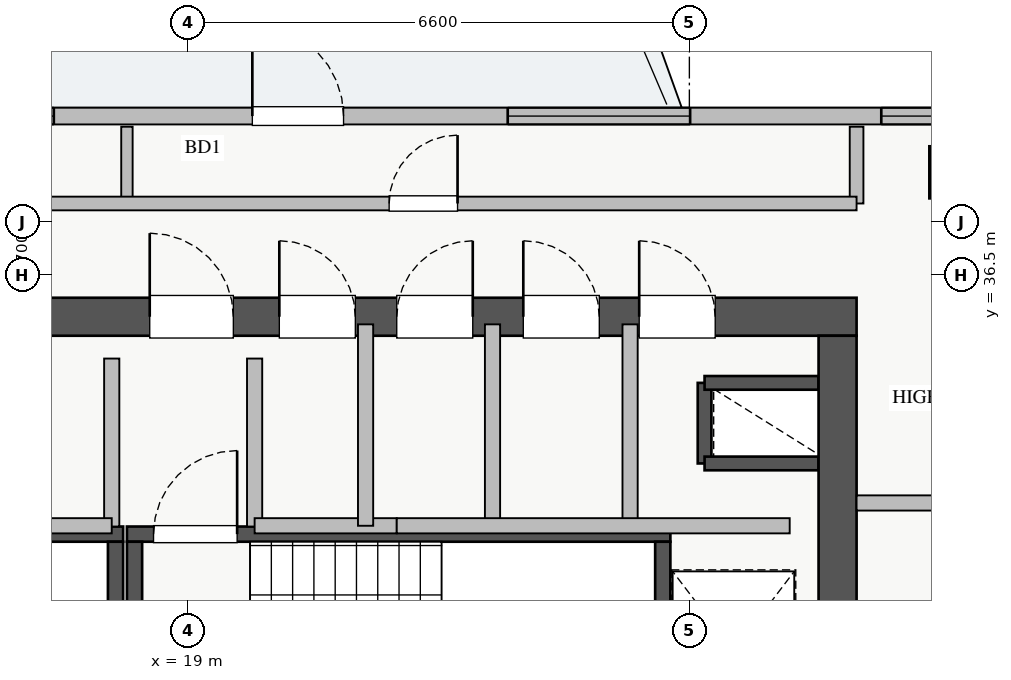
"""IFC4 building model, lengths in metres.
Left out: names, types, materials, properties, quantities, classifications, styles, units other than length and angle.
Written with IfcOpenShell. Run it as: python <this file> out.ifc"""

import sys

from ifc_helpers import new_model, si_unit, direction, frame, frame_2d, origin, origin_2d, place, context, subcontext, project, spatial, rectangle, extrude, source, transform, mapped, element, fill, save


model = new_model("IFC4")
c1 = context("Model", 3, precision=1e-05, world=origin(), true_north=direction((0.0, 1.0)))
c2 = subcontext(c1, "Body", "Model", "MODEL_VIEW")
j1 = project(units=[si_unit("LENGTHUNIT", "METRE"), si_unit("PLANEANGLEUNIT", "RADIAN")], contexts=[c1])
p1 = place(None, origin())
s1 = spatial("IfcSite", under=j1, at=p1, CompositionType="ELEMENT")
p2 = place(p1, origin())
s2 = spatial("IfcBuilding", under=s1, at=p2, CompositionType="ELEMENT")
p3 = place(p2, frame((0.0, 0.0, 253.5)))
s3 = spatial("IfcBuildingStorey", under=s2, at=p3, CompositionType="ELEMENT", Elevation=253.5)
p4 = place(p3, frame((25.8, 34.02, 0.0), z_axis=(0.0, 0.0, 1.0), x_axis=(0.0, 1.0, 0.0)))
e1 = element("IfcWall", 1, at=p4, inside=s3, PredefinedType="SHEAR", context=c2, shape_type="SweptSolid", body=[
    extrude(rectangle(XDim=1.06, YDim=0.18, at=frame_2d((0.53, 0.0))), origin(), (0.0, 0.0, 1.0), 3.07),
])
for number, where, z_axis, x_axis in (
    (2, (25.8, 35.08, 0.0), (0.0, 0.0, 1.0), (1.0, 0.0, 0.0)),
    (3, (25.8, 34.02, 0.0), (0.0, 0.0, 1.0), (1.0, 0.0, 0.0)),
):
    element("IfcWall", number, at=place(p3, frame(where, z_axis=z_axis, x_axis=x_axis)), inside=s3, PredefinedType="SHEAR", context=c2, shape_type="SweptSolid", body=[
        extrude(rectangle(XDim=1.5, YDim=0.18, at=frame_2d((0.75, 0.0))), origin(), (0.0, 0.0, 1.0), 3.07),
    ])
p5 = place(p3, frame((10.7, 33.09, 0.0), z_axis=(0.0, 0.0, 1.0), x_axis=(1.0, 0.0, 0.0)))
e4 = element("IfcWall", 4, at=p5, inside=s3, PredefinedType="SHEAR", context=c2, shape_type="SweptSolid", body=[
    extrude(rectangle(XDim=7.45, YDim=0.2, at=frame_2d((3.725, 0.0))), origin(), (0.0, 0.0, 1.0), 3.25),
])
p6 = place(p5, frame((0.35, 0.0, 0.0)))
e5 = element("IfcOpeningElement", 5, at=p6, cuts=e4, PredefinedType="OPENING", context=c2, shape_type="SweptSolid", body=[
    extrude(rectangle(XDim=1.1, YDim=2.05, at=frame_2d((0.55, 1.025))), frame((0.0, 0.11, 0.0), z_axis=(0.0, -1.0, 0.0), x_axis=(1.0, 0.0, 0.0)), (0.0, 0.0, 1.0), 0.22),
])
p7 = place(p3, frame((18.05, 30.05, 0.0), z_axis=(0.0, 0.0, 1.0), x_axis=(0.0, 1.0, 0.0)))
e6 = element("IfcWall", 6, at=p7, inside=s3, PredefinedType="SHEAR", context=c2, shape_type="SweptSolid", body=[
    extrude(rectangle(XDim=2.94, YDim=0.2, at=frame_2d((1.47, 0.0))), origin(), (0.0, 0.0, 1.0), 3.25),
])
p8 = place(p3, frame((18.2, 33.09, 0.0), z_axis=(0.0, 0.0, 1.0), x_axis=(1.0, 0.0, 0.0)))
e7 = element("IfcWall", 7, at=p8, inside=s3, PredefinedType="SHEAR", context=c2, shape_type="SweptSolid", body=[
    extrude(rectangle(XDim=7.15, YDim=0.2, at=frame_2d((3.575, 0.0))), origin(), (0.0, 0.0, 1.0), 3.25),
])
p9 = place(p8, frame((0.35, 0.0, 0.0)))
e8 = element("IfcOpeningElement", 8, at=p9, cuts=e7, PredefinedType="OPENING", context=c2, shape_type="SweptSolid", body=[
    extrude(rectangle(XDim=1.1, YDim=2.05, at=frame_2d((0.55, 1.025))), frame((0.0, 0.11, 0.0), z_axis=(0.0, -1.0, 0.0), x_axis=(1.0, 0.0, 0.0)), (0.0, 0.0, 1.0), 0.22),
])
for number, where, z_axis, x_axis in (
    (9, (18.3, 30.05, 0.0), (0.0, 0.0, 1.0), (0.0, 1.0, 0.0)),
    (10, (25.25, 30.05, 0.0), (0.0, 0.0, 1.0), (0.0, 1.0, 0.0)),
):
    element("IfcWall", number, at=place(p3, frame(where, z_axis=z_axis, x_axis=x_axis)), inside=s3, PredefinedType="SHEAR", context=c2, shape_type="SweptSolid", body=[
        extrude(rectangle(XDim=2.94, YDim=0.2, at=frame_2d((1.47, 0.0))), origin(), (0.0, 0.0, 1.0), 3.25),
    ])
p10 = place(p3, frame((10.2, 35.95, 0.0), z_axis=(0.0, 0.0, 1.0), x_axis=(1.0, 0.0, 0.0)))
e11 = element("IfcWall", 11, at=p10, inside=s3, PredefinedType="SHEAR", context=c2, shape_type="SweptSolid", body=[
    extrude(rectangle(XDim=17.6, YDim=0.5, at=frame_2d((8.8, 0.0))), origin(), (0.0, 0.0, 1.0), 3.25),
])
p11 = place(p10, frame((1.15, 0.0, 0.0)))
e12 = element("IfcOpeningElement", 12, at=p11, cuts=e11, PredefinedType="OPENING", context=c2, shape_type="SweptSolid", body=[
    extrude(rectangle(XDim=1.1, YDim=2.05, at=frame_2d((0.55, 1.025))), frame((0.0, 0.26, 0.0), z_axis=(0.0, -1.0, 0.0), x_axis=(1.0, 0.0, 0.0)), (0.0, 0.0, 1.0), 0.52),
])
p12 = place(p10, frame((8.3, 0.0, 0.0)))
e13 = element("IfcOpeningElement", 13, at=p12, cuts=e11, PredefinedType="OPENING", context=c2, shape_type="SweptSolid", body=[
    extrude(rectangle(XDim=1.1, YDim=2.05, at=frame_2d((0.55, 1.025))), frame((0.0, 0.26, 0.0), z_axis=(0.0, -1.0, 0.0), x_axis=(1.0, 0.0, 0.0)), (0.0, 0.0, 1.0), 0.52),
])
p13 = place(p10, frame((2.85, 0.0, 0.0)))
e14 = element("IfcOpeningElement", 14, at=p13, cuts=e11, PredefinedType="OPENING", context=c2, shape_type="SweptSolid", body=[
    extrude(rectangle(XDim=1.1, YDim=2.05, at=frame_2d((0.55, 1.025))), frame((0.0, 0.26, 0.0), z_axis=(0.0, -1.0, 0.0), x_axis=(1.0, 0.0, 0.0)), (0.0, 0.0, 1.0), 0.52),
])
p14 = place(p10, frame((5.8, 0.0, 0.0)))
e15 = element("IfcOpeningElement", 15, at=p14, cuts=e11, PredefinedType="OPENING", context=c2, shape_type="SweptSolid", body=[
    extrude(rectangle(XDim=1.0, YDim=2.05, at=frame_2d((0.5, 1.025))), frame((0.0, 0.26, 0.0), z_axis=(0.0, -1.0, 0.0), x_axis=(1.0, 0.0, 0.0)), (0.0, 0.0, 1.0), 0.52),
])
p15 = place(p10, frame((14.74, 0.0, 0.0)))
e16 = element("IfcOpeningElement", 16, at=p15, cuts=e11, PredefinedType="OPENING", context=c2, shape_type="SweptSolid", body=[
    extrude(rectangle(XDim=1.0, YDim=2.05, at=frame_2d((0.5, 1.025))), frame((0.0, 0.26, 0.0), z_axis=(0.0, -1.0, 0.0), x_axis=(1.0, 0.0, 0.0)), (0.0, 0.0, 1.0), 0.52),
])
p16 = place(p10, frame((10.005, 0.0, 0.0)))
e17 = element("IfcOpeningElement", 17, at=p16, cuts=e11, PredefinedType="OPENING", context=c2, shape_type="SweptSolid", body=[
    extrude(rectangle(XDim=1.0, YDim=2.05, at=frame_2d((0.5, 1.025))), frame((0.0, 0.26, 0.0), z_axis=(0.0, -1.0, 0.0), x_axis=(1.0, 0.0, 0.0)), (0.0, 0.0, 1.0), 0.52),
])
p17 = place(p10, frame((11.55, 0.0, 0.0)))
e18 = element("IfcOpeningElement", 18, at=p17, cuts=e11, PredefinedType="OPENING", context=c2, shape_type="SweptSolid", body=[
    extrude(rectangle(XDim=1.0, YDim=2.05, at=frame_2d((0.5, 1.025))), frame((0.0, 0.26, 0.0), z_axis=(0.0, -1.0, 0.0), x_axis=(1.0, 0.0, 0.0)), (0.0, 0.0, 1.0), 0.52),
])
p18 = place(p10, frame((13.215, 0.0, 0.0)))
e19 = element("IfcOpeningElement", 19, at=p18, cuts=e11, PredefinedType="OPENING", context=c2, shape_type="SweptSolid", body=[
    extrude(rectangle(XDim=1.0, YDim=2.05, at=frame_2d((0.5, 1.025))), frame((0.0, 0.26, 0.0), z_axis=(0.0, -1.0, 0.0), x_axis=(1.0, 0.0, 0.0)), (0.0, 0.0, 1.0), 0.52),
])
p19 = place(p3, frame((27.55, 29.5, 0.0), z_axis=(0.0, 0.0, 1.0), x_axis=(0.0, 1.0, 0.0)))
e20 = element("IfcWall", 20, at=p19, inside=s3, PredefinedType="SHEAR", context=c2, shape_type="SweptSolid", body=[
    extrude(rectangle(XDim=6.2, YDim=0.5, at=frame_2d((3.1, 0.0))), origin(), (0.0, 0.0, 1.0), 3.25),
])
p20 = place(p19, frame((1.1, 0.0, 0.0)))
e21 = element("IfcOpeningElement", 21, at=p20, cuts=e20, PredefinedType="OPENING", context=c2, shape_type="SweptSolid", body=[
    extrude(rectangle(XDim=1.3, YDim=2.05, at=frame_2d((0.65, 1.025))), frame((0.0, 0.26, 0.0), z_axis=(0.0, -1.0, 0.0), x_axis=(1.0, 0.0, 0.0)), (0.0, 0.0, 1.0), 0.52),
])
m1 = source(origin(), c2, "Body", "SweptSolid", [
    extrude(rectangle(XDim=0.65, YDim=0.65, at=origin_2d()), origin(), (0.0, 0.0, 1.0), 3.25),
])
p21 = place(p3, frame((29.1, 37.85, 0.0), z_axis=(0.0, 0.0, 1.0), x_axis=(1.0, 0.0, 0.0)))
e22 = element("IfcColumn", 22, at=p21, inside=s3, PredefinedType="COLUMN", context=c2, shape_type="MappedRepresentation", body=[
    mapped(m1, transform((0.0, 0.0, 0.0), x_axis=(1.0, 0.0, 0.0), y_axis=(0.0, 1.0, 0.0), z_axis=(0.0, 0.0, 1.0), scale=1.0)),
])
p22 = place(p3, frame((8.35, 38.59, 0.0), z_axis=(0.0, 0.0, 1.0), x_axis=(1.0, 0.0, 0.0)))
e23 = element("IfcWall", 23, at=p22, inside=s3, PredefinedType="STANDARD", context=c2, shape_type="SweptSolid", body=[
    extrude(rectangle(XDim=21.3, YDim=0.22, at=frame_2d((10.65, 0.0))), origin(), (0.0, 0.0, 1.0), 2.61),
])
p23 = place(p22, frame((11.5, 0.0, 0.0)))
e24 = element("IfcOpeningElement", 24, at=p23, cuts=e23, PredefinedType="OPENING", context=c2, shape_type="SweptSolid", body=[
    extrude(rectangle(XDim=1.2, YDim=2.1, at=frame_2d((0.6, 1.05))), frame((0.0, 0.12, 0.0), z_axis=(0.0, -1.0, 0.0), x_axis=(1.0, 0.0, 0.0)), (0.0, 0.0, 1.0), 0.24),
])
p24 = place(p22, frame((1.463, 0.0, 0.9)))
e25 = element("IfcOpeningElement", 25, at=p24, cuts=e23, PredefinedType="OPENING", context=c2, shape_type="SweptSolid", body=[
    extrude(rectangle(XDim=2.4, YDim=1.48, at=frame_2d((1.2, 0.74))), frame((0.0, 0.12, 0.0), z_axis=(0.0, -1.0, 0.0), x_axis=(1.0, 0.0, 0.0)), (0.0, 0.0, 1.0), 0.24),
])
p25 = place(p22, frame((7.088, 0.0, 0.9)))
e26 = element("IfcOpeningElement", 26, at=p25, cuts=e23, PredefinedType="OPENING", context=c2, shape_type="SweptSolid", body=[
    extrude(rectangle(XDim=1.8, YDim=1.45, at=frame_2d((0.9, 0.725))), frame((0.0, 0.12, 0.0), z_axis=(0.0, -1.0, 0.0), x_axis=(1.0, 0.0, 0.0)), (0.0, 0.0, 1.0), 0.24),
])
p26 = place(p22, frame((19.775, 0.0, 0.9)))
e27 = element("IfcOpeningElement", 27, at=p26, cuts=e23, PredefinedType="OPENING", context=c2, shape_type="SweptSolid", body=[
    extrude(rectangle(XDim=1.2, YDim=1.4, at=frame_2d((0.6, 0.7))), frame((0.0, 0.12, 0.0), z_axis=(0.0, -1.0, 0.0), x_axis=(1.0, 0.0, 0.0)), (0.0, 0.0, 1.0), 0.24),
])
p27 = place(p22, frame((14.86, 0.0, 0.9)))
e28 = element("IfcOpeningElement", 28, at=p27, cuts=e23, PredefinedType="OPENING", context=c2, shape_type="SweptSolid", body=[
    extrude(rectangle(XDim=2.4, YDim=1.5, at=frame_2d((1.2, 0.75))), frame((0.0, 0.12, 0.0), z_axis=(0.0, -1.0, 0.0), x_axis=(1.0, 0.0, 0.0)), (0.0, 0.0, 1.0), 0.24),
])
p28 = place(p3, frame((27.8, 33.5, 0.0), z_axis=(0.0, 0.0, 1.0), x_axis=(1.0, 0.0, 0.0)))
e29 = element("IfcWall", 29, at=p28, inside=s3, PredefinedType="PARTITIONING", context=c2, shape_type="SweptSolid", body=[
    extrude(rectangle(XDim=3.1, YDim=0.2, at=frame_2d((1.55, 0.0))), origin(), (0.0, 0.0, 1.0), 3.07),
])
for number, where, z_axis, x_axis in (
    (30, (18.0, 33.19, 0.0), (0.0, 0.0, 1.0), (0.0, 1.0, 0.0)),
    (31, (19.88, 33.19, 0.0), (0.0, 0.0, 1.0), (0.0, 1.0, 0.0)),
):
    element("IfcWall", number, at=place(p3, frame(where, z_axis=z_axis, x_axis=x_axis)), inside=s3, PredefinedType="PARTITIONING", context=c2, shape_type="SweptSolid", body=[
        extrude(rectangle(XDim=2.21, YDim=0.2, at=frame_2d((1.105, 0.0))), origin(), (0.0, 0.0, 1.0), 3.07),
    ])
p29 = place(p3, frame((14.72, 33.2, 0.0), z_axis=(0.0, 0.0, 1.0), x_axis=(1.0, 0.0, 0.0)))
e32 = element("IfcWall", 32, at=p29, inside=s3, PredefinedType="PARTITIONING", context=c2, shape_type="SweptSolid", body=[
    extrude(rectangle(XDim=3.28, YDim=0.2, at=frame_2d((1.64, 0.0))), origin(), (0.0, 0.0, 1.0), 3.07),
])
p30 = place(p3, frame((24.82, 33.2, 0.0), z_axis=(0.0, 0.0, 1.0), x_axis=(0.0, 1.0, 0.0)))
e33 = element("IfcWall", 33, at=p30, inside=s3, PredefinedType="PARTITIONING", context=c2, shape_type="SweptSolid", body=[
    extrude(rectangle(XDim=2.65, YDim=0.2, at=frame_2d((1.325, 0.0))), origin(), (0.0, 0.0, 1.0), 3.07),
])
p31 = place(p3, frame((19.88, 33.2, 0.0), z_axis=(0.0, 0.0, 1.0), x_axis=(1.0, 0.0, 0.0)))
e34 = element("IfcWall", 34, at=p31, inside=s3, PredefinedType="PARTITIONING", context=c2, shape_type="SweptSolid", body=[
    extrude(rectangle(XDim=1.87, YDim=0.2, at=frame_2d((0.935, 0.0))), origin(), (0.0, 0.0, 1.0), 3.07),
])
for number, where, z_axis, x_axis in (
    (35, (21.34, 33.2, 0.0), (0.0, 0.0, 1.0), (0.0, 1.0, 0.0)),
    (36, (23.01, 33.2, 0.0), (0.0, 0.0, 1.0), (0.0, 1.0, 0.0)),
):
    element("IfcWall", number, at=place(p3, frame(where, z_axis=z_axis, x_axis=x_axis)), inside=s3, PredefinedType="PARTITIONING", context=c2, shape_type="SweptSolid", body=[
        extrude(rectangle(XDim=2.65, YDim=0.2, at=frame_2d((1.325, 0.0))), origin(), (0.0, 0.0, 1.0), 3.07),
    ])
p32 = place(p3, frame((21.75, 33.2, 0.0), z_axis=(0.0, 0.0, 1.0), x_axis=(1.0, 0.0, 0.0)))
e37 = element("IfcWall", 37, at=p32, inside=s3, PredefinedType="PARTITIONING", context=c2, shape_type="SweptSolid", body=[
    extrude(rectangle(XDim=5.17, YDim=0.2, at=frame_2d((2.585, 0.0))), origin(), (0.0, 0.0, 1.0), 3.07),
])
p33 = place(p3, frame((27.8, 37.44, 0.0), z_axis=(0.0, 0.0, 1.0), x_axis=(0.0, 1.0, 0.0)))
e38 = element("IfcWall", 38, at=p33, inside=s3, PredefinedType="PARTITIONING", context=c2, shape_type="SweptSolid", body=[
    extrude(rectangle(XDim=1.01, YDim=0.18, at=frame_2d((0.505, 0.0))), origin(), (0.0, 0.0, 1.0), 3.07),
])
p34 = place(p3, frame((18.2, 37.44, 0.0), z_axis=(0.0, 0.0, 1.0), x_axis=(0.0, 1.0, 0.0)))
e39 = element("IfcWall", 39, at=p34, inside=s3, PredefinedType="PARTITIONING", context=c2, shape_type="SweptSolid", body=[
    extrude(rectangle(XDim=1.01, YDim=0.15, at=frame_2d((0.505, 0.0))), origin(), (0.0, 0.0, 1.0), 3.07),
])
p35 = place(p3, frame((8.85, 37.44, 0.0), z_axis=(0.0, 0.0, 1.0), x_axis=(1.0, 0.0, 0.0)))
e40 = element("IfcWall", 40, at=p35, inside=s3, PredefinedType="PARTITIONING", context=c2, shape_type="SweptSolid", body=[
    extrude(rectangle(XDim=18.95, YDim=0.18, at=frame_2d((9.475, 0.0))), origin(), (0.0, 0.0, 1.0), 3.07),
])
p36 = place(p35, frame((4.2, 0.0, 0.0)))
e41 = element("IfcOpeningElement", 41, at=p36, cuts=e40, PredefinedType="OPENING", context=c2, shape_type="SweptSolid", body=[
    extrude(rectangle(XDim=0.9, YDim=2.05, at=frame_2d((0.45, 1.025))), frame((0.0, 0.1, 0.0), z_axis=(0.0, -1.0, 0.0), x_axis=(1.0, 0.0, 0.0)), (0.0, 0.0, 1.0), 0.2),
])
p37 = place(p35, frame((12.8, 0.0, 0.0)))
e42 = element("IfcOpeningElement", 42, at=p37, cuts=e40, PredefinedType="OPENING", context=c2, shape_type="SweptSolid", body=[
    extrude(rectangle(XDim=0.9, YDim=2.05, at=frame_2d((0.45, 1.025))), frame((0.0, 0.1, 0.0), z_axis=(0.0, -1.0, 0.0), x_axis=(1.0, 0.0, 0.0)), (0.0, 0.0, 1.0), 0.2),
])
m2 = source(origin(), c2, "Body", "SweptSolid", [
    extrude(rectangle(XDim=1.2, YDim=2.1, at=frame_2d((0.6, 1.05))), frame((0.0, 0.025, 0.0), z_axis=(0.0, -1.0, 0.0), x_axis=(1.0, 0.0, 0.0)), (0.0, 0.0, 1.0), 0.05),
])
p38 = place(p23, origin())
e43 = element("IfcDoor", 43, at=p38, inside=s3, OperationType="SINGLE_SWING_LEFT", PredefinedType="DOOR", context=c2, shape_type="MappedRepresentation", body=[
    mapped(m2, transform((0.0, 0.0, 0.0), x_axis=(1.0, 0.0, 0.0), y_axis=(0.0, 1.0, 0.0), z_axis=(0.0, 0.0, 1.0), scale=1.0)),
])
fill(e24, e43)
m3 = source(origin(), c2, "Body", "SweptSolid", [
    extrude(rectangle(XDim=1.8, YDim=1.45, at=frame_2d((0.9, 0.725))), frame((0.0, 0.03, 0.0), z_axis=(0.0, -1.0, 0.0), x_axis=(1.0, 0.0, 0.0)), (0.0, 0.0, 1.0), 0.06),
])
p39 = place(p25, origin())
e44 = element("IfcWindow", 44, at=p39, inside=s3, PartitioningType="DOUBLE_PANEL_VERTICAL", PredefinedType="WINDOW", context=c2, shape_type="MappedRepresentation", body=[
    mapped(m3, transform((0.0, 0.0, 0.0), x_axis=(1.0, 0.0, 0.0), y_axis=(0.0, 1.0, 0.0), z_axis=(0.0, 0.0, 1.0), scale=1.0)),
])
fill(e26, e44)
m4 = source(origin(), c2, "Body", "SweptSolid", [
    extrude(rectangle(XDim=1.2, YDim=1.4, at=frame_2d((0.6, 0.7))), frame((0.0, 0.03, 0.0), z_axis=(0.0, -1.0, 0.0), x_axis=(1.0, 0.0, 0.0)), (0.0, 0.0, 1.0), 0.06),
])
p40 = place(p26, origin())
e45 = element("IfcWindow", 45, at=p40, inside=s3, PartitioningType="TRIPLE_PANEL_VERTICAL", PredefinedType="WINDOW", context=c2, shape_type="MappedRepresentation", body=[
    mapped(m4, transform((0.0, 0.0, 0.0), x_axis=(1.0, 0.0, 0.0), y_axis=(0.0, 1.0, 0.0), z_axis=(0.0, 0.0, 1.0), scale=1.0)),
])
fill(e27, e45)
m5 = source(origin(), c2, "Body", "SweptSolid", [
    extrude(rectangle(XDim=1.1, YDim=2.05, at=frame_2d((0.55, 1.025))), frame((0.0, 0.025, 0.0), z_axis=(0.0, -1.0, 0.0), x_axis=(1.0, 0.0, 0.0)), (0.0, 0.0, 1.0), 0.05),
])
p41 = place(p12, origin())
e46 = element("IfcDoor", 46, at=p41, inside=s3, OperationType="SINGLE_SWING_LEFT", PredefinedType="DOOR", context=c2, shape_type="MappedRepresentation", body=[
    mapped(m5, transform((0.0, 0.0, 0.0), x_axis=(1.0, 0.0, 0.0), y_axis=(0.0, 1.0, 0.0), z_axis=(0.0, 0.0, 1.0), scale=1.0)),
])
fill(e13, e46)
p42 = place(p9, origin())
e47 = element("IfcDoor", 47, at=p42, inside=s3, OperationType="SINGLE_SWING_RIGHT", PredefinedType="DOOR", context=c2, shape_type="MappedRepresentation", body=[
    mapped(m5, transform((0.0, 0.0, 0.0), x_axis=(1.0, 0.0, 0.0), y_axis=(0.0, 1.0, 0.0), z_axis=(0.0, 0.0, 1.0), scale=1.0)),
])
fill(e8, e47)
m6 = source(origin(), c2, "Body", "SweptSolid", [
    extrude(rectangle(XDim=1.0, YDim=2.05, at=frame_2d((0.5, 1.025))), frame((0.0, 0.025, 0.0), z_axis=(0.0, -1.0, 0.0), x_axis=(1.0, 0.0, 0.0)), (0.0, 0.0, 1.0), 0.05),
])
p43 = place(p15, origin())
e48 = element("IfcDoor", 48, at=p43, inside=s3, OperationType="SINGLE_SWING_LEFT", PredefinedType="DOOR", context=c2, shape_type="MappedRepresentation", body=[
    mapped(m6, transform((0.0, 0.0, 0.0), x_axis=(1.0, 0.0, 0.0), y_axis=(0.0, 1.0, 0.0), z_axis=(0.0, 0.0, 1.0), scale=1.0)),
])
fill(e16, e48)
p44 = place(p16, origin())
e49 = element("IfcDoor", 49, at=p44, inside=s3, OperationType="SINGLE_SWING_LEFT", PredefinedType="DOOR", context=c2, shape_type="MappedRepresentation", body=[
    mapped(m6, transform((0.0, 0.0, 0.0), x_axis=(1.0, 0.0, 0.0), y_axis=(0.0, 1.0, 0.0), z_axis=(0.0, 0.0, 1.0), scale=1.0)),
])
fill(e17, e49)
p45 = place(p17, origin())
e50 = element("IfcDoor", 50, at=p45, inside=s3, OperationType="SINGLE_SWING_RIGHT", PredefinedType="DOOR", context=c2, shape_type="MappedRepresentation", body=[
    mapped(m6, transform((0.0, 0.0, 0.0), x_axis=(1.0, 0.0, 0.0), y_axis=(0.0, 1.0, 0.0), z_axis=(0.0, 0.0, 1.0), scale=1.0)),
])
fill(e18, e50)
p46 = place(p18, origin())
e51 = element("IfcDoor", 51, at=p46, inside=s3, OperationType="SINGLE_SWING_LEFT", PredefinedType="DOOR", context=c2, shape_type="MappedRepresentation", body=[
    mapped(m6, transform((0.0, 0.0, 0.0), x_axis=(1.0, 0.0, 0.0), y_axis=(0.0, 1.0, 0.0), z_axis=(0.0, 0.0, 1.0), scale=1.0)),
])
fill(e19, e51)
m7 = source(origin(), c2, "Body", "SweptSolid", [
    extrude(rectangle(XDim=0.9, YDim=2.05, at=frame_2d((0.45, 1.025))), frame((0.0, 0.025, 0.0), z_axis=(0.0, -1.0, 0.0), x_axis=(1.0, 0.0, 0.0)), (0.0, 0.0, 1.0), 0.05),
])
p47 = place(p37, origin())
e52 = element("IfcDoor", 52, at=p47, inside=s3, OperationType="SINGLE_SWING_RIGHT", PredefinedType="DOOR", context=c2, shape_type="MappedRepresentation", body=[
    mapped(m7, transform((0.0, 0.0, 0.0), x_axis=(1.0, 0.0, 0.0), y_axis=(0.0, 1.0, 0.0), z_axis=(0.0, 0.0, 1.0), scale=1.0)),
])
fill(e42, e52)
m8 = source(origin(), c2, "Body", "SweptSolid", [
    extrude(rectangle(XDim=2.4, YDim=1.5, at=frame_2d((1.2, 0.75))), frame((0.0, 0.03, 0.0), z_axis=(0.0, -1.0, 0.0), x_axis=(1.0, 0.0, 0.0)), (0.0, 0.0, 1.0), 0.06),
])
p48 = place(p27, origin())
e53 = element("IfcWindow", 53, at=p48, inside=s3, PartitioningType="TRIPLE_PANEL_VERTICAL", PredefinedType="WINDOW", context=c2, shape_type="MappedRepresentation", body=[
    mapped(m8, transform((0.0, 0.0, 0.0), x_axis=(1.0, 0.0, 0.0), y_axis=(0.0, 1.0, 0.0), z_axis=(0.0, 0.0, 1.0), scale=1.0)),
])
fill(e28, e53)
save(model, sys.argv[1])
